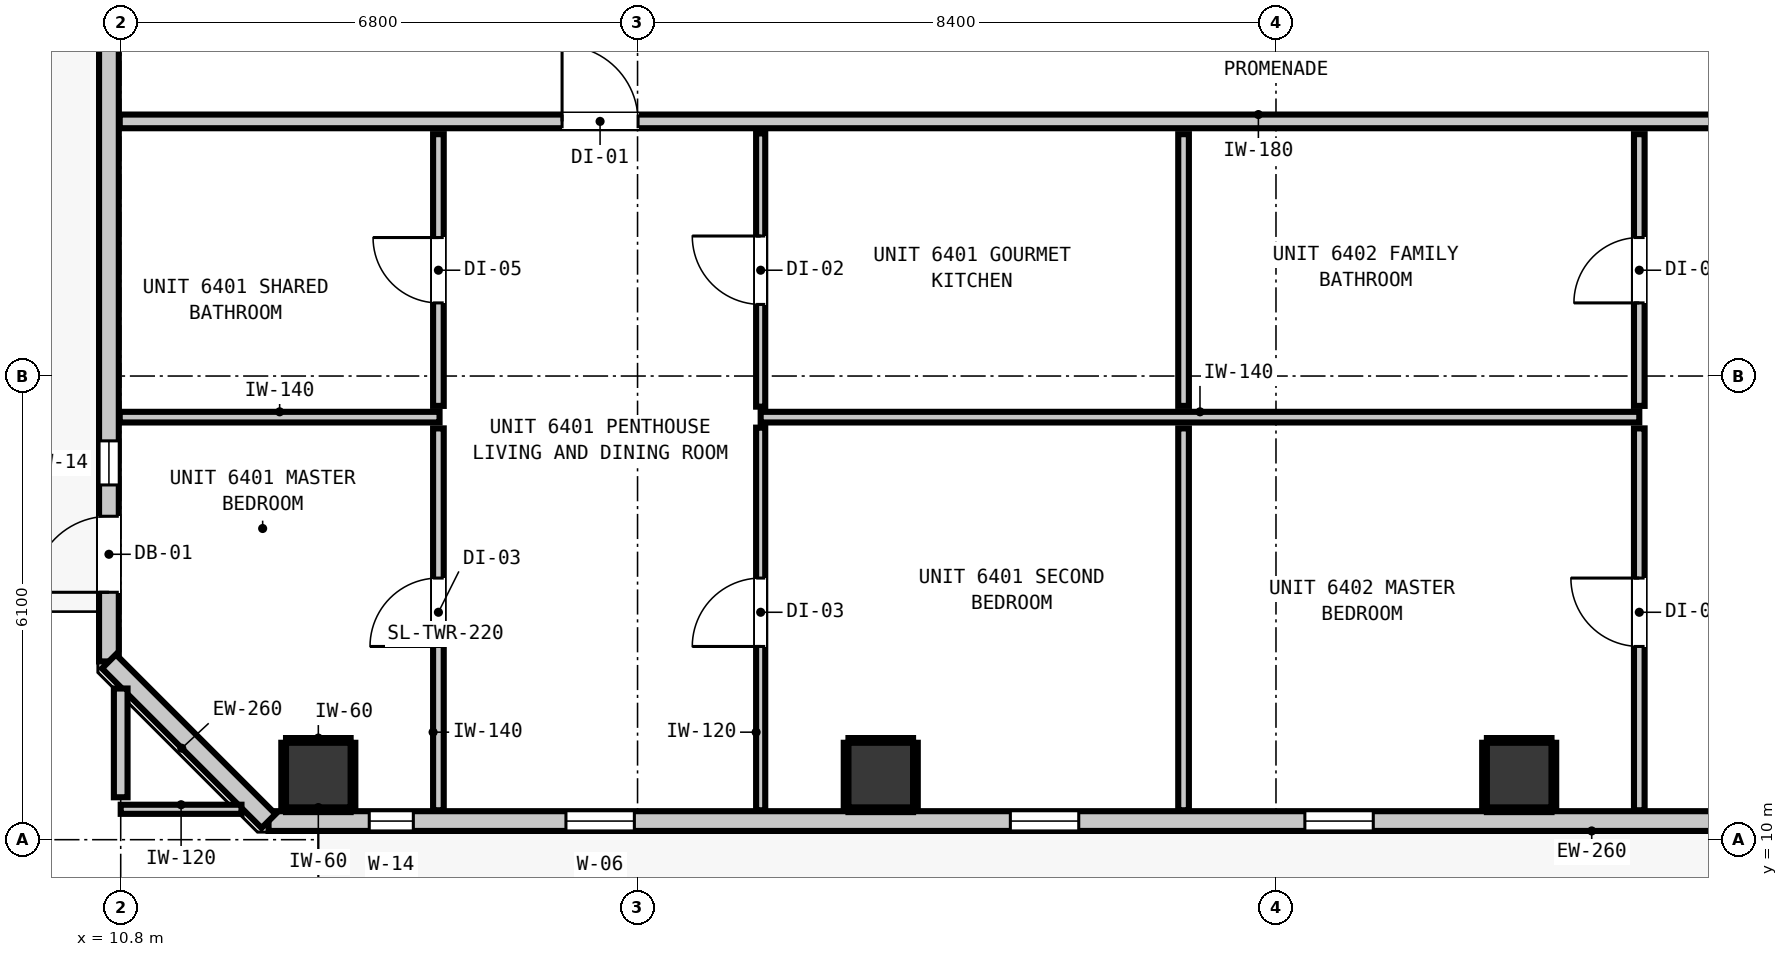
"""IFC4 building model, lengths in metres.
Left out: names, types, materials, properties, quantities, classifications, styles, units other than length and angle.
Written with IfcOpenShell. Run it as: python <this file> out.ifc"""

import sys

from ifc_helpers import new_model, si_unit, direction, frame, frame_2d, origin, origin_2d, place, context, subcontext, project, spatial, rectangle, extrude, element, fill, save


model = new_model("IFC4")
c1 = context("Model", 3, precision=1e-05, world=origin(), true_north=direction((0.0, 1.0)))
c2 = subcontext(c1, "Body", "Model", "MODEL_VIEW")
j1 = project(units=[si_unit("LENGTHUNIT", "METRE"), si_unit("PLANEANGLEUNIT", "RADIAN")], contexts=[c1])
p1 = place(None, origin())
s1 = spatial("IfcSite", under=j1, at=p1, CompositionType="ELEMENT")
p2 = place(p1, origin())
s2 = spatial("IfcBuilding", under=s1, at=p2, CompositionType="ELEMENT")
p3 = place(p2, frame((0.0, 0.0, 220.04)))
s3 = spatial("IfcBuildingStorey", under=s2, at=p3, CompositionType="ELEMENT", Elevation=220.04)
for number, where, z_axis, x_axis in (
    (1, (13.4, 10.85, 0.0), (0.0, 0.0, 1.0), (1.0, 0.0, 0.0)),
    (2, (20.8, 10.85, 0.0), (0.0, 0.0, 1.0), (1.0, 0.0, 0.0)),
    (3, (29.2, 10.85, 0.0), (0.0, 0.0, 1.0), (1.0, 0.0, 0.0)),
):
    element("IfcColumn", number, at=place(p3, frame(where, z_axis=z_axis, x_axis=x_axis)), inside=s3, PredefinedType="COLUMN", context=c2, shape_type="SweptSolid", body=[
        extrude(rectangle(XDim=0.85, YDim=0.85, at=origin_2d()), origin(), (0.0, 0.0, 1.0), 3.32),
    ])
p4 = place(p3, frame((10.645, 12.345, 0.0), z_axis=(0.0, 0.0, 1.0), x_axis=(0.0, 1.0, 0.0)))
e4 = element("IfcWall", 4, at=p4, inside=s3, PredefinedType="STANDARD", context=c2, shape_type="SweptSolid", body=[
    extrude(rectangle(XDim=30.31, YDim=0.26, at=frame_2d((15.155, 0.0))), origin(), (0.0, 0.0, 1.0), 3.1),
])
p5 = place(p4, frame((0.91, 0.0, 0.0)))
e5 = element("IfcOpeningElement", 5, at=p5, cuts=e4, PredefinedType="OPENING", context=c2, shape_type="SweptSolid", body=[
    extrude(rectangle(XDim=1.0, YDim=2.15, at=frame_2d((0.5, 1.075))), frame((0.0, 0.14, 0.0), z_axis=(0.0, -1.0, 0.0), x_axis=(1.0, 0.0, 0.0)), (0.0, 0.0, 1.0), 0.28),
])
p6 = place(p4, frame((2.322, 0.0, 0.85)))
e6 = element("IfcOpeningElement", 6, at=p6, cuts=e4, PredefinedType="OPENING", context=c2, shape_type="SweptSolid", body=[
    extrude(rectangle(XDim=0.58, YDim=1.5, at=frame_2d((0.29, 0.75))), frame((0.0, 0.14, 0.0), z_axis=(0.0, -1.0, 0.0), x_axis=(1.0, 0.0, 0.0)), (0.0, 0.0, 1.0), 0.28),
])
p7 = place(p3, frame((45.455, 10.245, 0.0), z_axis=(0.0, 0.0, 1.0), x_axis=(-1.0, 0.0, 0.0)))
e7 = element("IfcWall", 7, at=p7, inside=s3, PredefinedType="STANDARD", context=c2, shape_type="SweptSolid", body=[
    extrude(rectangle(XDim=32.71, YDim=0.26, at=frame_2d((16.355, 0.0))), origin(), (0.0, 0.0, 1.0), 3.1),
])
p8 = place(p7, frame((2.665, 0.0, 0.0)))
e8 = element("IfcOpeningElement", 8, at=p8, cuts=e7, PredefinedType="OPENING", context=c2, shape_type="SweptSolid", body=[
    extrude(rectangle(XDim=1.0, YDim=2.15, at=frame_2d((0.5, 1.075))), frame((0.0, 0.14, 0.0), z_axis=(0.0, -1.0, 0.0), x_axis=(1.0, 0.0, 0.0)), (0.0, 0.0, 1.0), 0.28),
])
p9 = place(p7, frame((27.897, 0.0, 0.85)))
e9 = element("IfcOpeningElement", 9, at=p9, cuts=e7, PredefinedType="OPENING", context=c2, shape_type="SweptSolid", body=[
    extrude(rectangle(XDim=0.9, YDim=1.5, at=frame_2d((0.45, 0.75))), frame((0.0, 0.14, 0.0), z_axis=(0.0, -1.0, 0.0), x_axis=(1.0, 0.0, 0.0)), (0.0, 0.0, 1.0), 0.28),
])
p10 = place(p7, frame((30.805, 0.0, 0.85)))
e10 = element("IfcOpeningElement", 10, at=p10, cuts=e7, PredefinedType="OPENING", context=c2, shape_type="SweptSolid", body=[
    extrude(rectangle(XDim=0.58, YDim=1.5, at=frame_2d((0.29, 0.75))), frame((0.0, 0.14, 0.0), z_axis=(0.0, -1.0, 0.0), x_axis=(1.0, 0.0, 0.0)), (0.0, 0.0, 1.0), 0.28),
])
p11 = place(p7, frame((22.05, 0.0, 0.85)))
e11 = element("IfcOpeningElement", 11, at=p11, cuts=e7, PredefinedType="OPENING", context=c2, shape_type="SweptSolid", body=[
    extrude(rectangle(XDim=0.9, YDim=1.5, at=frame_2d((0.45, 0.75))), frame((0.0, 0.14, 0.0), z_axis=(0.0, -1.0, 0.0), x_axis=(1.0, 0.0, 0.0)), (0.0, 0.0, 1.0), 0.28),
])
p12 = place(p7, frame((11.527, 0.0, 0.85)))
e12 = element("IfcOpeningElement", 12, at=p12, cuts=e7, PredefinedType="OPENING", context=c2, shape_type="SweptSolid", body=[
    extrude(rectangle(XDim=0.9, YDim=1.5, at=frame_2d((0.45, 0.75))), frame((0.0, 0.14, 0.0), z_axis=(0.0, -1.0, 0.0), x_axis=(1.0, 0.0, 0.0)), (0.0, 0.0, 1.0), 0.28),
])
p13 = place(p7, frame((18.175, 0.0, 0.85)))
e13 = element("IfcOpeningElement", 13, at=p13, cuts=e7, PredefinedType="OPENING", context=c2, shape_type="SweptSolid", body=[
    extrude(rectangle(XDim=0.9, YDim=1.5, at=frame_2d((0.45, 0.75))), frame((0.0, 0.14, 0.0), z_axis=(0.0, -1.0, 0.0), x_axis=(1.0, 0.0, 0.0)), (0.0, 0.0, 1.0), 0.28),
])
p14 = place(p7, frame((5.12, 0.0, 0.85)))
e14 = element("IfcOpeningElement", 14, at=p14, cuts=e7, PredefinedType="OPENING", context=c2, shape_type="SweptSolid", body=[
    extrude(rectangle(XDim=0.9, YDim=1.5, at=frame_2d((0.45, 0.75))), frame((0.0, 0.14, 0.0), z_axis=(0.0, -1.0, 0.0), x_axis=(1.0, 0.0, 0.0)), (0.0, 0.0, 1.0), 0.28),
])
p15 = place(p7, frame((0.623, 0.0, 0.85)))
e15 = element("IfcOpeningElement", 15, at=p15, cuts=e7, PredefinedType="OPENING", context=c2, shape_type="SweptSolid", body=[
    extrude(rectangle(XDim=0.9, YDim=1.5, at=frame_2d((0.45, 0.75))), frame((0.0, 0.14, 0.0), z_axis=(0.0, -1.0, 0.0), x_axis=(1.0, 0.0, 0.0)), (0.0, 0.0, 1.0), 0.28),
])
p16 = place(p3, frame((12.745, 10.245, 0.0), z_axis=(0.0, 0.0, 1.0), x_axis=(-0.707147883682, 0.707065676302, 0.0)))
e16 = element("IfcWall", 16, at=p16, inside=s3, PredefinedType="STANDARD", context=c2, shape_type="SweptSolid", body=[
    extrude(rectangle(XDim=2.97, YDim=0.26, at=frame_2d((1.485, 0.0))), origin(), (0.0, 0.0, 1.0), 3.1),
])
p17 = place(p3, frame((10.787, 19.45, 0.0), z_axis=(0.0, 0.0, 1.0), x_axis=(1.0, 0.0, 0.0)))
e17 = element("IfcWall", 17, at=p17, inside=s3, PredefinedType="PARTITIONING", context=c2, shape_type="SweptSolid", body=[
    extrude(rectangle(XDim=36.626, YDim=0.18, at=frame_2d((18.313, 0.0))), origin(), (0.0, 0.0, 1.0), 3.1),
])
p18 = place(p17, frame((5.82, 0.0, 0.0)))
e18 = element("IfcOpeningElement", 18, at=p18, cuts=e17, PredefinedType="OPENING", context=c2, shape_type="SweptSolid", body=[
    extrude(rectangle(XDim=1.0, YDim=2.15, at=frame_2d((0.5, 1.075))), frame((0.0, 0.1, 0.0), z_axis=(0.0, -1.0, 0.0), x_axis=(1.0, 0.0, 0.0)), (0.0, 0.0, 1.0), 0.2),
])
p19 = place(p17, frame((23.143, 0.0, 0.0)))
e19 = element("IfcOpeningElement", 19, at=p19, cuts=e17, PredefinedType="OPENING", context=c2, shape_type="SweptSolid", body=[
    extrude(rectangle(XDim=1.0, YDim=2.15, at=frame_2d((0.5, 1.075))), frame((0.0, 0.1, 0.0), z_axis=(0.0, -1.0, 0.0), x_axis=(1.0, 0.0, 0.0)), (0.0, 0.0, 1.0), 0.2),
])
p20 = place(p3, frame((10.787, 15.559, 0.0), z_axis=(0.0, 0.0, 1.0), x_axis=(1.0, 0.0, 0.0)))
e20 = element("IfcWall", 20, at=p20, inside=s3, PredefinedType="PARTITIONING", context=c2, shape_type="SweptSolid", body=[
    extrude(rectangle(XDim=4.208, YDim=0.14, at=frame_2d((2.104, 0.0))), origin(), (0.0, 0.0, 1.0), 3.1),
])
p21 = place(p3, frame((19.22, 15.559, 0.0), z_axis=(0.0, 0.0, 1.0), x_axis=(1.0, 0.0, 0.0)))
e21 = element("IfcWall", 21, at=p21, inside=s3, PredefinedType="PARTITIONING", context=c2, shape_type="SweptSolid", body=[
    extrude(rectangle(XDim=11.56, YDim=0.14, at=frame_2d((5.78, 0.0))), origin(), (0.0, 0.0, 1.0), 3.1),
])
p22 = place(p3, frame((10.8, 10.4, 0.0), z_axis=(0.0, 0.0, 1.0), x_axis=(1.0, 0.0, 0.0)))
e22 = element("IfcWall", 22, at=p22, inside=s3, PredefinedType="PARTITIONING", context=c2, shape_type="SweptSolid", body=[
    extrude(rectangle(XDim=1.589, YDim=0.12, at=frame_2d((0.794, 0.0))), origin(), (0.0, 0.0, 1.0), 3.1),
])
p23 = place(p3, frame((10.8, 10.558, 0.0), z_axis=(0.0, 0.0, 1.0), x_axis=(0.0, 1.0, 0.0)))
e23 = element("IfcWall", 23, at=p23, inside=s3, PredefinedType="PARTITIONING", context=c2, shape_type="SweptSolid", body=[
    extrude(rectangle(XDim=1.431, YDim=0.18, at=frame_2d((0.715, 0.0))), origin(), (0.0, 0.0, 1.0), 3.1),
])
p24 = place(p3, frame((14.98, 10.387, 0.0), z_axis=(0.0, 0.0, 1.0), x_axis=(0.0, 1.0, 0.0)))
e24 = element("IfcWall", 24, at=p24, inside=s3, PredefinedType="PARTITIONING", context=c2, shape_type="SweptSolid", body=[
    extrude(rectangle(XDim=5.024, YDim=0.14, at=frame_2d((2.512, 0.0))), origin(), (0.0, 0.0, 1.0), 3.1),
])
p25 = place(p24, frame((2.155, 0.0, 0.0)))
e25 = element("IfcOpeningElement", 25, at=p25, cuts=e24, PredefinedType="OPENING", context=c2, shape_type="SweptSolid", body=[
    extrude(rectangle(XDim=0.9, YDim=2.1, at=frame_2d((0.45, 1.05))), frame((0.0, 0.08, 0.0), z_axis=(0.0, -1.0, 0.0), x_axis=(1.0, 0.0, 0.0)), (0.0, 0.0, 1.0), 0.16),
])
p26 = place(p3, frame((14.98, 15.707, 0.0), z_axis=(0.0, 0.0, 1.0), x_axis=(0.0, 1.0, 0.0)))
e26 = element("IfcWall", 26, at=p26, inside=s3, PredefinedType="PARTITIONING", context=c2, shape_type="SweptSolid", body=[
    extrude(rectangle(XDim=3.575, YDim=0.14, at=frame_2d((1.788, 0.0))), origin(), (0.0, 0.0, 1.0), 3.1),
])
p27 = place(p26, frame((1.355, 0.0, 0.0)))
e27 = element("IfcOpeningElement", 27, at=p27, cuts=e26, PredefinedType="OPENING", context=c2, shape_type="SweptSolid", body=[
    extrude(rectangle(XDim=0.86, YDim=2.02, at=frame_2d((0.43, 1.01))), frame((0.0, 0.08, 0.0), z_axis=(0.0, -1.0, 0.0), x_axis=(1.0, 0.0, 0.0)), (0.0, 0.0, 1.0), 0.16),
])
p28 = place(p3, frame((24.784, 10.387, 0.0), z_axis=(0.0, 0.0, 1.0), x_axis=(0.0, 1.0, 0.0)))
e28 = element("IfcWall", 28, at=p28, inside=s3, PredefinedType="PARTITIONING", context=c2, shape_type="SweptSolid", body=[
    extrude(rectangle(XDim=5.024, YDim=0.14, at=frame_2d((2.512, 0.0))), origin(), (0.0, 0.0, 1.0), 3.1),
])
p29 = place(p3, frame((24.784, 15.707, 0.0), z_axis=(0.0, 0.0, 1.0), x_axis=(0.0, 1.0, 0.0)))
e29 = element("IfcWall", 29, at=p29, inside=s3, PredefinedType="PARTITIONING", context=c2, shape_type="SweptSolid", body=[
    extrude(rectangle(XDim=3.575, YDim=0.14, at=frame_2d((1.788, 0.0))), origin(), (0.0, 0.0, 1.0), 3.1),
])
p30 = place(p3, frame((30.78, 10.387, 0.0), z_axis=(0.0, 0.0, 1.0), x_axis=(0.0, 1.0, 0.0)))
e30 = element("IfcWall", 30, at=p30, inside=s3, PredefinedType="PARTITIONING", context=c2, shape_type="SweptSolid", body=[
    extrude(rectangle(XDim=5.024, YDim=0.14, at=frame_2d((2.512, 0.0))), origin(), (0.0, 0.0, 1.0), 3.1),
])
p31 = place(p30, frame((2.155, 0.0, 0.0)))
e31 = element("IfcOpeningElement", 31, at=p31, cuts=e30, PredefinedType="OPENING", context=c2, shape_type="SweptSolid", body=[
    extrude(rectangle(XDim=0.9, YDim=2.1, at=frame_2d((0.45, 1.05))), frame((0.0, 0.08, 0.0), z_axis=(0.0, -1.0, 0.0), x_axis=(1.0, 0.0, 0.0)), (0.0, 0.0, 1.0), 0.16),
])
p32 = place(p3, frame((30.78, 15.707, 0.0), z_axis=(0.0, 0.0, 1.0), x_axis=(0.0, 1.0, 0.0)))
e32 = element("IfcWall", 32, at=p32, inside=s3, PredefinedType="PARTITIONING", context=c2, shape_type="SweptSolid", body=[
    extrude(rectangle(XDim=3.575, YDim=0.14, at=frame_2d((1.788, 0.0))), origin(), (0.0, 0.0, 1.0), 3.1),
])
p33 = place(p32, frame((1.355, 0.0, 0.0)))
e33 = element("IfcOpeningElement", 33, at=p33, cuts=e32, PredefinedType="OPENING", context=c2, shape_type="SweptSolid", body=[
    extrude(rectangle(XDim=0.86, YDim=2.02, at=frame_2d((0.43, 1.01))), frame((0.0, 0.08, 0.0), z_axis=(0.0, -1.0, 0.0), x_axis=(1.0, 0.0, 0.0)), (0.0, 0.0, 1.0), 0.16),
])
p34 = place(p3, frame((19.22, 10.387, 0.0), z_axis=(0.0, 0.0, 1.0), x_axis=(0.0, 1.0, 0.0)))
e34 = element("IfcWall", 34, at=p34, inside=s3, PredefinedType="PARTITIONING", context=c2, shape_type="SweptSolid", body=[
    extrude(rectangle(XDim=5.034, YDim=0.12, at=frame_2d((2.517, 0.0))), origin(), (0.0, 0.0, 1.0), 3.1),
])
p35 = place(p34, frame((2.155, 0.0, 0.0)))
e35 = element("IfcOpeningElement", 35, at=p35, cuts=e34, PredefinedType="OPENING", context=c2, shape_type="SweptSolid", body=[
    extrude(rectangle(XDim=0.9, YDim=2.1, at=frame_2d((0.45, 1.05))), frame((0.0, 0.07, 0.0), z_axis=(0.0, -1.0, 0.0), x_axis=(1.0, 0.0, 0.0)), (0.0, 0.0, 1.0), 0.14),
])
p36 = place(p3, frame((19.22, 15.697, 0.0), z_axis=(0.0, 0.0, 1.0), x_axis=(0.0, 1.0, 0.0)))
e36 = element("IfcWall", 36, at=p36, inside=s3, PredefinedType="PARTITIONING", context=c2, shape_type="SweptSolid", body=[
    extrude(rectangle(XDim=3.595, YDim=0.12, at=frame_2d((1.797, 0.0))), origin(), (0.0, 0.0, 1.0), 3.1),
])
p37 = place(p36, frame((1.345, 0.0, 0.0)))
e37 = element("IfcOpeningElement", 37, at=p37, cuts=e36, PredefinedType="OPENING", context=c2, shape_type="SweptSolid", body=[
    extrude(rectangle(XDim=0.9, YDim=2.1, at=frame_2d((0.45, 1.05))), frame((0.0, 0.07, 0.0), z_axis=(0.0, -1.0, 0.0), x_axis=(1.0, 0.0, 0.0)), (0.0, 0.0, 1.0), 0.14),
])
for number, where, z_axis, x_axis in (
    (38, (12.975, 10.393, 0.0), (0.0, 0.0, 1.0), (1.0, 0.0, 0.0)),
    (39, (12.975, 11.307, 0.0), (0.0, 0.0, 1.0), (1.0, 0.0, 0.0)),
    (40, (12.943, 10.425, 0.0), (0.0, 0.0, 1.0), (0.0, 1.0, 0.0)),
    (41, (13.857, 10.425, 0.0), (0.0, 0.0, 1.0), (0.0, 1.0, 0.0)),
):
    element("IfcWall", number, at=place(p3, frame(where, z_axis=z_axis, x_axis=x_axis)), inside=s3, PredefinedType="PARTITIONING", context=c2, shape_type="SweptSolid", body=[
        extrude(rectangle(XDim=0.85, YDim=0.06, at=frame_2d((0.425, 0.0))), origin(), (0.0, 0.0, 1.0), 1.45),
    ])
for number, where, z_axis, x_axis in (
    (42, (20.375, 10.393, 0.0), (0.0, 0.0, 1.0), (1.0, 0.0, 0.0)),
    (43, (20.375, 11.307, 0.0), (0.0, 0.0, 1.0), (1.0, 0.0, 0.0)),
):
    element("IfcWall", number, at=place(p3, frame(where, z_axis=z_axis, x_axis=x_axis)), inside=s3, PredefinedType="PARTITIONING", context=c2, shape_type="SweptSolid", body=[
        extrude(rectangle(XDim=0.85, YDim=0.06, at=frame_2d((0.425, 0.0))), origin(), (0.0, 0.0, 1.0), 1.45),
    ])
for number, where, z_axis, x_axis in (
    (44, (20.343, 10.425, 0.0), (0.0, 0.0, 1.0), (0.0, 1.0, 0.0)),
    (45, (21.257, 10.425, 0.0), (0.0, 0.0, 1.0), (0.0, 1.0, 0.0)),
):
    element("IfcWall", number, at=place(p3, frame(where, z_axis=z_axis, x_axis=x_axis)), inside=s3, PredefinedType="PARTITIONING", context=c2, shape_type="SweptSolid", body=[
        extrude(rectangle(XDim=0.85, YDim=0.06, at=frame_2d((0.425, 0.0))), origin(), (0.0, 0.0, 1.0), 1.45),
    ])
for number, where, z_axis, x_axis in (
    (46, (28.775, 10.393, 0.0), (0.0, 0.0, 1.0), (1.0, 0.0, 0.0)),
    (47, (28.775, 11.307, 0.0), (0.0, 0.0, 1.0), (1.0, 0.0, 0.0)),
):
    element("IfcWall", number, at=place(p3, frame(where, z_axis=z_axis, x_axis=x_axis)), inside=s3, PredefinedType="PARTITIONING", context=c2, shape_type="SweptSolid", body=[
        extrude(rectangle(XDim=0.85, YDim=0.06, at=frame_2d((0.425, 0.0))), origin(), (0.0, 0.0, 1.0), 1.45),
    ])
for number, where, z_axis, x_axis in (
    (48, (28.743, 10.425, 0.0), (0.0, 0.0, 1.0), (0.0, 1.0, 0.0)),
    (49, (29.657, 10.425, 0.0), (0.0, 0.0, 1.0), (0.0, 1.0, 0.0)),
):
    element("IfcWall", number, at=place(p3, frame(where, z_axis=z_axis, x_axis=x_axis)), inside=s3, PredefinedType="PARTITIONING", context=c2, shape_type="SweptSolid", body=[
        extrude(rectangle(XDim=0.85, YDim=0.06, at=frame_2d((0.425, 0.0))), origin(), (0.0, 0.0, 1.0), 1.45),
    ])
p38 = place(p5, origin())
e50 = element("IfcDoor", 50, at=p38, inside=s3, OperationType="SINGLE_SWING_LEFT", PredefinedType="DOOR", context=c2, shape_type="SweptSolid", body=[
    extrude(rectangle(XDim=1.0, YDim=2.15, at=frame_2d((0.5, 1.075))), frame((0.0, 0.025, 0.0), z_axis=(0.0, -1.0, 0.0), x_axis=(1.0, 0.0, 0.0)), (0.0, 0.0, 1.0), 0.05),
])
fill(e5, e50)
p39 = place(p6, origin())
e51 = element("IfcWindow", 51, at=p39, inside=s3, PartitioningType="SINGLE_PANEL", PredefinedType="WINDOW", context=c2, shape_type="SweptSolid", body=[
    extrude(rectangle(XDim=0.58, YDim=1.5, at=frame_2d((0.29, 0.75))), frame((0.0, 0.03, 0.0), z_axis=(0.0, -1.0, 0.0), x_axis=(1.0, 0.0, 0.0)), (0.0, 0.0, 1.0), 0.06),
])
fill(e6, e51)
p40 = place(p9, origin())
e52 = element("IfcWindow", 52, at=p40, inside=s3, PartitioningType="SINGLE_PANEL", PredefinedType="WINDOW", context=c2, shape_type="SweptSolid", body=[
    extrude(rectangle(XDim=0.9, YDim=1.5, at=frame_2d((0.45, 0.75))), frame((0.0, 0.03, 0.0), z_axis=(0.0, -1.0, 0.0), x_axis=(1.0, 0.0, 0.0)), (0.0, 0.0, 1.0), 0.06),
])
fill(e9, e52)
p41 = place(p10, origin())
e53 = element("IfcWindow", 53, at=p41, inside=s3, PartitioningType="SINGLE_PANEL", PredefinedType="WINDOW", context=c2, shape_type="SweptSolid", body=[
    extrude(rectangle(XDim=0.58, YDim=1.5, at=frame_2d((0.29, 0.75))), frame((0.0, 0.03, 0.0), z_axis=(0.0, -1.0, 0.0), x_axis=(1.0, 0.0, 0.0)), (0.0, 0.0, 1.0), 0.06),
])
fill(e10, e53)
p42 = place(p11, origin())
e54 = element("IfcWindow", 54, at=p42, inside=s3, PartitioningType="SINGLE_PANEL", PredefinedType="WINDOW", context=c2, shape_type="SweptSolid", body=[
    extrude(rectangle(XDim=0.9, YDim=1.5, at=frame_2d((0.45, 0.75))), frame((0.0, 0.03, 0.0), z_axis=(0.0, -1.0, 0.0), x_axis=(1.0, 0.0, 0.0)), (0.0, 0.0, 1.0), 0.06),
])
fill(e11, e54)
p43 = place(p13, origin())
e55 = element("IfcWindow", 55, at=p43, inside=s3, PartitioningType="SINGLE_PANEL", PredefinedType="WINDOW", context=c2, shape_type="SweptSolid", body=[
    extrude(rectangle(XDim=0.9, YDim=1.5, at=frame_2d((0.45, 0.75))), frame((0.0, 0.03, 0.0), z_axis=(0.0, -1.0, 0.0), x_axis=(1.0, 0.0, 0.0)), (0.0, 0.0, 1.0), 0.06),
])
fill(e13, e55)
p44 = place(p18, origin())
e56 = element("IfcDoor", 56, at=p44, inside=s3, OperationType="SINGLE_SWING_LEFT", PredefinedType="DOOR", context=c2, shape_type="SweptSolid", body=[
    extrude(rectangle(XDim=1.0, YDim=2.15, at=frame_2d((0.5, 1.075))), frame((0.0, 0.025, 0.0), z_axis=(0.0, -1.0, 0.0), x_axis=(1.0, 0.0, 0.0)), (0.0, 0.0, 1.0), 0.05),
])
fill(e18, e56)
p45 = place(p27, origin())
e57 = element("IfcDoor", 57, at=p45, inside=s3, OperationType="SINGLE_SWING_RIGHT", PredefinedType="DOOR", context=c2, shape_type="SweptSolid", body=[
    extrude(rectangle(XDim=0.86, YDim=2.02, at=frame_2d((0.43, 1.01))), frame((0.0, 0.025, 0.0), z_axis=(0.0, -1.0, 0.0), x_axis=(1.0, 0.0, 0.0)), (0.0, 0.0, 1.0), 0.05),
])
fill(e27, e57)
p46 = place(p25, origin())
e58 = element("IfcDoor", 58, at=p46, inside=s3, OperationType="SINGLE_SWING_LEFT", PredefinedType="DOOR", context=c2, shape_type="SweptSolid", body=[
    extrude(rectangle(XDim=0.9, YDim=2.1, at=frame_2d((0.45, 1.05))), frame((0.0, 0.025, 0.0), z_axis=(0.0, -1.0, 0.0), x_axis=(1.0, 0.0, 0.0)), (0.0, 0.0, 1.0), 0.05),
])
fill(e25, e58)
p47 = place(p37, origin())
e59 = element("IfcDoor", 59, at=p47, inside=s3, OperationType="SINGLE_SWING_RIGHT", PredefinedType="DOOR", context=c2, shape_type="SweptSolid", body=[
    extrude(rectangle(XDim=0.9, YDim=2.1, at=frame_2d((0.45, 1.05))), frame((0.0, 0.025, 0.0), z_axis=(0.0, -1.0, 0.0), x_axis=(1.0, 0.0, 0.0)), (0.0, 0.0, 1.0), 0.05),
])
fill(e37, e59)
p48 = place(p35, origin())
e60 = element("IfcDoor", 60, at=p48, inside=s3, OperationType="SINGLE_SWING_LEFT", PredefinedType="DOOR", context=c2, shape_type="SweptSolid", body=[
    extrude(rectangle(XDim=0.9, YDim=2.1, at=frame_2d((0.45, 1.05))), frame((0.0, 0.025, 0.0), z_axis=(0.0, -1.0, 0.0), x_axis=(1.0, 0.0, 0.0)), (0.0, 0.0, 1.0), 0.05),
])
fill(e35, e60)
p49 = place(p33, origin())
e61 = element("IfcDoor", 61, at=p49, inside=s3, OperationType="SINGLE_SWING_LEFT", PredefinedType="DOOR", context=c2, shape_type="SweptSolid", body=[
    extrude(rectangle(XDim=0.86, YDim=2.02, at=frame_2d((0.43, 1.01))), frame((0.0, 0.025, 0.0), z_axis=(0.0, -1.0, 0.0), x_axis=(1.0, 0.0, 0.0)), (0.0, 0.0, 1.0), 0.05),
])
fill(e33, e61)
p50 = place(p31, origin())
e62 = element("IfcDoor", 62, at=p50, inside=s3, OperationType="SINGLE_SWING_RIGHT", PredefinedType="DOOR", context=c2, shape_type="SweptSolid", body=[
    extrude(rectangle(XDim=0.9, YDim=2.1, at=frame_2d((0.45, 1.05))), frame((0.0, 0.025, 0.0), z_axis=(0.0, -1.0, 0.0), x_axis=(1.0, 0.0, 0.0)), (0.0, 0.0, 1.0), 0.05),
])
fill(e31, e62)
save(model, sys.argv[1])
